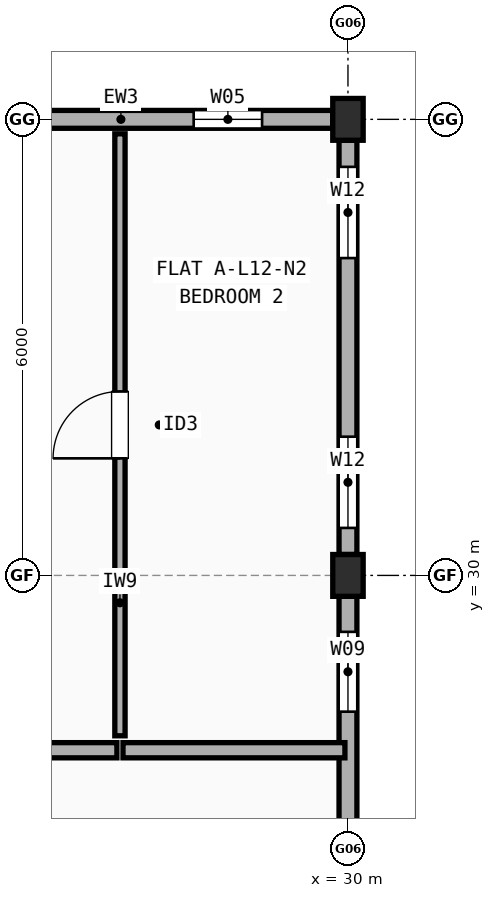
"""IFC4 building model, lengths in metres.
Left out: names, types, materials, properties, quantities, classifications, styles, units other than length and angle.
Written with IfcOpenShell. Run it as: python <this file> out.ifc"""

import sys

from ifc_helpers import new_model, si_unit, direction, frame, frame_2d, origin, origin_2d, place, context, subcontext, project, spatial, rectangle, extrude, element, fill, save


model = new_model("IFC4")
c1 = context("Model", 3, precision=1e-05, world=origin(), true_north=direction((0.0, 1.0)))
c2 = subcontext(c1, "Body", "Model", "MODEL_VIEW")
j1 = project(units=[si_unit("LENGTHUNIT", "METRE"), si_unit("PLANEANGLEUNIT", "RADIAN")], contexts=[c1])
p1 = place(None, origin())
s1 = spatial("IfcSite", under=j1, at=p1, CompositionType="ELEMENT")
p2 = place(p1, origin())
s2 = spatial("IfcBuilding", under=s1, at=p2, CompositionType="ELEMENT")
p3 = place(p2, frame((0.0, 0.0, 39.7)))
s3 = spatial("IfcBuildingStorey", under=s2, at=p3, CompositionType="ELEMENT", Elevation=39.7)
for number, where, z_axis, x_axis in (
    (1, (30.0, 30.0, 0.0), (0.0, 0.0, 1.0), (1.0, 0.0, 0.0)),
    (2, (30.0, 36.0, 0.0), (0.0, 0.0, 1.0), (1.0, 0.0, 0.0)),
):
    element("IfcColumn", number, at=place(p3, frame(where, z_axis=z_axis, x_axis=x_axis)), inside=s3, PredefinedType="COLUMN", context=c2, shape_type="SweptSolid", body=[
        extrude(rectangle(XDim=0.4, YDim=0.55, at=origin_2d()), origin(), (0.0, 0.0, 1.0), 3.0),
    ])
p4 = place(p3, frame((30.0, 24.275, 0.0), z_axis=(0.0, 0.0, 1.0), x_axis=(0.0, 1.0, 0.0)))
e3 = element("IfcWall", 3, at=p4, inside=s3, PredefinedType="STANDARD", context=c2, shape_type="SweptSolid", body=[
    extrude(rectangle(XDim=5.45, YDim=0.235, at=frame_2d((2.725, 0.0))), origin(), (0.0, 0.0, 1.0), 2.482),
])
p5 = place(p4, frame((1.192, 0.0, 0.9)))
e4 = element("IfcOpeningElement", 4, at=p5, cuts=e3, PredefinedType="OPENING", context=c2, shape_type="SweptSolid", body=[
    extrude(rectangle(XDim=1.0, YDim=1.4, at=frame_2d((0.5, 0.7))), frame((0.0, 0.127, 0.0), z_axis=(0.0, -1.0, 0.0), x_axis=(1.0, 0.0, 0.0)), (0.0, 0.0, 1.0), 0.255),
])
p6 = place(p4, frame((3.933, 0.0, 0.9)))
e5 = element("IfcOpeningElement", 5, at=p6, cuts=e3, PredefinedType="OPENING", context=c2, shape_type="SweptSolid", body=[
    extrude(rectangle(XDim=1.05, YDim=1.35, at=frame_2d((0.525, 0.675))), frame((0.0, 0.127, 0.0), z_axis=(0.0, -1.0, 0.0), x_axis=(1.0, 0.0, 0.0)), (0.0, 0.0, 1.0), 0.255),
])
p7 = place(p3, frame((30.0, 30.275, 0.0), z_axis=(0.0, 0.0, 1.0), x_axis=(0.0, 1.0, 0.0)))
e6 = element("IfcWall", 6, at=p7, inside=s3, PredefinedType="STANDARD", context=c2, shape_type="SweptSolid", body=[
    extrude(rectangle(XDim=5.45, YDim=0.235, at=frame_2d((2.725, 0.0))), origin(), (0.0, 0.0, 1.0), 2.482),
])
p8 = place(p7, frame((0.35, 0.0, 0.9)))
e7 = element("IfcOpeningElement", 7, at=p8, cuts=e6, PredefinedType="OPENING", context=c2, shape_type="SweptSolid", body=[
    extrude(rectangle(XDim=1.2, YDim=1.35, at=frame_2d((0.6, 0.675))), frame((0.0, 0.127, 0.0), z_axis=(0.0, -1.0, 0.0), x_axis=(1.0, 0.0, 0.0)), (0.0, 0.0, 1.0), 0.255),
])
p9 = place(p7, frame((3.9, 0.0, 0.9)))
e8 = element("IfcOpeningElement", 8, at=p9, cuts=e6, PredefinedType="OPENING", context=c2, shape_type="SweptSolid", body=[
    extrude(rectangle(XDim=1.2, YDim=1.35, at=frame_2d((0.6, 0.675))), frame((0.0, 0.127, 0.0), z_axis=(0.0, -1.0, 0.0), x_axis=(1.0, 0.0, 0.0)), (0.0, 0.0, 1.0), 0.255),
])
p10 = place(p3, frame((29.8, 36.0, 0.0), z_axis=(0.0, 0.0, 1.0), x_axis=(-1.0, 0.0, 0.0)))
e9 = element("IfcWall", 9, at=p10, inside=s3, PredefinedType="STANDARD", context=c2, shape_type="SweptSolid", body=[
    extrude(rectangle(XDim=5.6, YDim=0.235, at=frame_2d((2.8, 0.0))), origin(), (0.0, 0.0, 1.0), 2.482),
])
p11 = place(p10, frame((0.93, 0.0, 0.9)))
e10 = element("IfcOpeningElement", 10, at=p11, cuts=e9, PredefinedType="OPENING", context=c2, shape_type="SweptSolid", body=[
    extrude(rectangle(XDim=0.9, YDim=1.4, at=frame_2d((0.45, 0.7))), frame((0.0, 0.127, 0.0), z_axis=(0.0, -1.0, 0.0), x_axis=(1.0, 0.0, 0.0)), (0.0, 0.0, 1.0), 0.255),
])
p12 = place(p10, frame((3.745, 0.0, 0.9)))
e11 = element("IfcOpeningElement", 11, at=p12, cuts=e9, PredefinedType="OPENING", context=c2, shape_type="SweptSolid", body=[
    extrude(rectangle(XDim=0.95, YDim=1.35, at=frame_2d((0.475, 0.675))), frame((0.0, 0.127, 0.0), z_axis=(0.0, -1.0, 0.0), x_axis=(1.0, 0.0, 0.0)), (0.0, 0.0, 1.0), 0.255),
])
p13 = place(p3, frame((19.54, 27.7, 0.0), z_axis=(0.0, 0.0, 1.0), x_axis=(1.0, 0.0, 0.0)))
e12 = element("IfcWall", 12, at=p13, inside=s3, PredefinedType="SOLIDWALL", context=c2, shape_type="SweptSolid", body=[
    extrude(rectangle(XDim=7.42, YDim=0.2, at=frame_2d((3.71, 0.0))), origin(), (0.0, 0.0, 1.0), 3.0),
])
p14 = place(p13, frame((3.185, 0.0, 0.0)))
e13 = element("IfcOpeningElement", 13, at=p14, cuts=e12, PredefinedType="OPENING", context=c2, shape_type="SweptSolid", body=[
    extrude(rectangle(XDim=1.05, YDim=2.15, at=frame_2d((0.525, 1.075))), frame((0.0, 0.11, 0.0), z_axis=(0.0, -1.0, 0.0), x_axis=(1.0, 0.0, 0.0)), (0.0, 0.0, 1.0), 0.22),
])
p15 = place(p3, frame((27.04, 27.7, 0.0), z_axis=(0.0, 0.0, 1.0), x_axis=(1.0, 0.0, 0.0)))
e14 = element("IfcWall", 14, at=p15, inside=s3, PredefinedType="SOLIDWALL", context=c2, shape_type="SweptSolid", body=[
    extrude(rectangle(XDim=2.92, YDim=0.2, at=frame_2d((1.46, 0.0))), origin(), (0.0, 0.0, 1.0), 2.482),
])
p16 = place(p3, frame((27.0, 27.89, 0.0), z_axis=(0.0, 0.0, 1.0), x_axis=(0.0, 1.0, 0.0)))
e15 = element("IfcWall", 15, at=p16, inside=s3, PredefinedType="PARTITIONING", context=c2, shape_type="SweptSolid", body=[
    extrude(rectangle(XDim=7.92, YDim=0.135, at=frame_2d((3.96, 0.0))), origin(), (0.0, 0.0, 1.0), 2.532),
])
p17 = place(p16, frame((3.65, 0.0, 0.0)))
e16 = element("IfcOpeningElement", 16, at=p17, cuts=e15, PredefinedType="OPENING", context=c2, shape_type="SweptSolid", body=[
    extrude(rectangle(XDim=0.88, YDim=2.1, at=frame_2d((0.44, 1.05))), frame((0.0, 0.077, 0.0), z_axis=(0.0, -1.0, 0.0), x_axis=(1.0, 0.0, 0.0)), (0.0, 0.0, 1.0), 0.155),
])
p18 = place(p6, origin())
e17 = element("IfcWindow", 17, at=p18, inside=s3, PartitioningType="SINGLE_PANEL", PredefinedType="WINDOW", context=c2, shape_type="SweptSolid", body=[
    extrude(rectangle(XDim=1.05, YDim=1.35, at=frame_2d((0.525, 0.675))), frame((0.0, 0.03, 0.0), z_axis=(0.0, -1.0, 0.0), x_axis=(1.0, 0.0, 0.0)), (0.0, 0.0, 1.0), 0.06),
])
fill(e5, e17)
p19 = place(p8, origin())
e18 = element("IfcWindow", 18, at=p19, inside=s3, PartitioningType="SINGLE_PANEL", PredefinedType="WINDOW", context=c2, shape_type="SweptSolid", body=[
    extrude(rectangle(XDim=1.2, YDim=1.35, at=frame_2d((0.6, 0.675))), frame((0.0, 0.03, 0.0), z_axis=(0.0, -1.0, 0.0), x_axis=(1.0, 0.0, 0.0)), (0.0, 0.0, 1.0), 0.06),
])
fill(e7, e18)
p20 = place(p9, origin())
e19 = element("IfcWindow", 19, at=p20, inside=s3, PartitioningType="SINGLE_PANEL", PredefinedType="WINDOW", context=c2, shape_type="SweptSolid", body=[
    extrude(rectangle(XDim=1.2, YDim=1.35, at=frame_2d((0.6, 0.675))), frame((0.0, 0.03, 0.0), z_axis=(0.0, -1.0, 0.0), x_axis=(1.0, 0.0, 0.0)), (0.0, 0.0, 1.0), 0.06),
])
fill(e8, e19)
p21 = place(p11, origin())
e20 = element("IfcWindow", 20, at=p21, inside=s3, PartitioningType="SINGLE_PANEL", PredefinedType="WINDOW", context=c2, shape_type="SweptSolid", body=[
    extrude(rectangle(XDim=0.9, YDim=1.4, at=frame_2d((0.45, 0.7))), frame((0.0, 0.03, 0.0), z_axis=(0.0, -1.0, 0.0), x_axis=(1.0, 0.0, 0.0)), (0.0, 0.0, 1.0), 0.06),
])
fill(e10, e20)
p22 = place(p17, origin())
e21 = element("IfcDoor", 21, at=p22, inside=s3, OperationType="SINGLE_SWING_LEFT", PredefinedType="DOOR", context=c2, shape_type="SweptSolid", body=[
    extrude(rectangle(XDim=0.88, YDim=2.1, at=frame_2d((0.44, 1.05))), frame((0.0, 0.025, 0.0), z_axis=(0.0, -1.0, 0.0), x_axis=(1.0, 0.0, 0.0)), (0.0, 0.0, 1.0), 0.05),
])
fill(e16, e21)
save(model, sys.argv[1])
